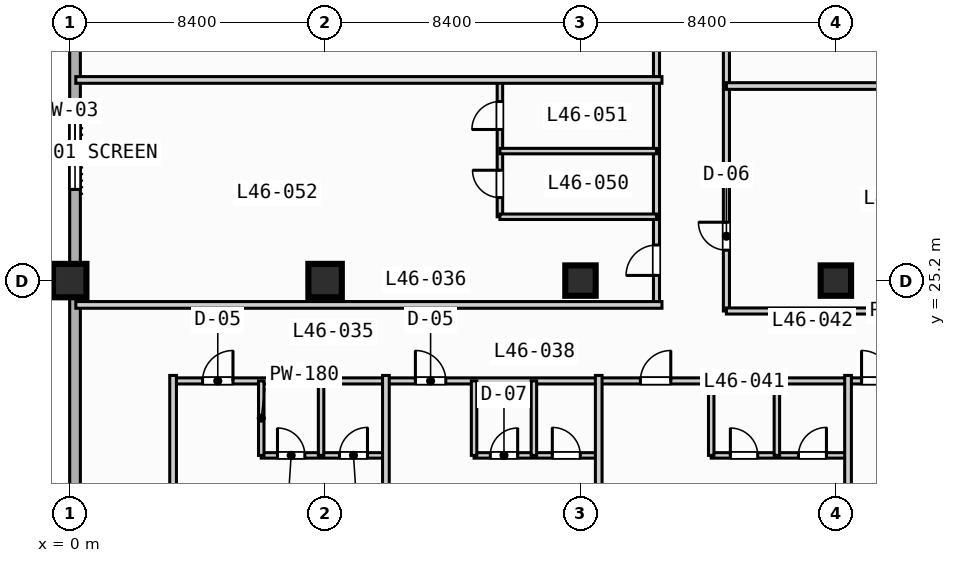
"""IFC4 building model, lengths in metres.
Left out: names, types, materials, properties, quantities, classifications, styles, units other than length and angle.
Written with IfcOpenShell. Run it as: python <this file> out.ifc"""

import sys

from ifc_helpers import new_model, si_unit, direction, frame, frame_2d, origin, origin_2d, place, context, subcontext, project, spatial, rectangle, extrude, element, fill, save


model = new_model("IFC4")
c1 = context("Model", 3, precision=1e-05, world=origin(), true_north=direction((0.0, 1.0)))
c2 = subcontext(c1, "Body", "Model", "MODEL_VIEW")
j1 = project(units=[si_unit("LENGTHUNIT", "METRE"), si_unit("PLANEANGLEUNIT", "RADIAN")], contexts=[c1])
p1 = place(None, origin())
s1 = spatial("IfcSite", under=j1, at=p1, CompositionType="ELEMENT")
p2 = place(p1, origin())
s2 = spatial("IfcBuilding", under=s1, at=p2, CompositionType="ELEMENT")
p3 = place(p2, frame((0.0, 0.0, 190.2)))
s3 = spatial("IfcBuildingStorey", under=s2, at=p3, CompositionType="ELEMENT", Elevation=190.2)
for number, where, z_axis, x_axis in (
    (1, (0.0, 25.2, 0.0), (0.0, 0.0, 1.0), (1.0, 0.0, 0.0)),
    (2, (8.4, 25.2, 0.0), (0.0, 0.0, 1.0), (1.0, 0.0, 0.0)),
):
    element("IfcColumn", number, at=place(p3, frame(where, z_axis=z_axis, x_axis=x_axis)), inside=s3, PredefinedType="COLUMN", context=c2, shape_type="SweptSolid", body=[
        extrude(rectangle(XDim=1.1, YDim=1.1, at=origin_2d()), origin(), (0.0, 0.0, 1.0), 3.7),
    ])
for number, where, z_axis, x_axis in (
    (3, (16.8, 25.2, 0.0), (0.0, 0.0, 1.0), (1.0, 0.0, 0.0)),
    (4, (25.2, 25.2, 0.0), (0.0, 0.0, 1.0), (1.0, 0.0, 0.0)),
):
    element("IfcColumn", number, at=place(p3, frame(where, z_axis=z_axis, x_axis=x_axis)), inside=s3, PredefinedType="COLUMN", context=c2, shape_type="SweptSolid", body=[
        extrude(rectangle(XDim=1.0, YDim=1.0, at=origin_2d()), origin(), (0.0, 0.0, 1.0), 3.7),
    ])
p4 = place(p3, frame((0.175, 3.175, 0.0), z_axis=(0.0, 0.0, 1.0), x_axis=(0.0, 1.0, 0.0)))
e5 = element("IfcWall", 5, at=p4, inside=s3, PredefinedType="STANDARD", context=c2, shape_type="SweptSolid", body=[
    extrude(rectangle(XDim=69.25, YDim=0.35, at=frame_2d((34.625, 0.0))), origin(), (0.0, 0.0, 1.0), 3.47),
])
p5 = place(p4, frame((42.325, 0.0, 0.0)))
e6 = element("IfcOpeningElement", 6, at=p5, cuts=e5, PredefinedType="OPENING", context=c2, shape_type="SweptSolid", body=[
    extrude(rectangle(XDim=1.4, YDim=2.2, at=frame_2d((0.7, 1.1))), frame((0.0, 0.185, 0.0), z_axis=(0.0, -1.0, 0.0), x_axis=(1.0, 0.0, 0.0)), (0.0, 0.0, 1.0), 0.37),
])
p6 = place(p4, frame((25.025, 0.0, 0.85)))
e7 = element("IfcOpeningElement", 7, at=p6, cuts=e5, PredefinedType="OPENING", context=c2, shape_type="SweptSolid", body=[
    extrude(rectangle(XDim=2.4, YDim=1.95, at=frame_2d((1.2, 0.975))), frame((0.0, 0.185, 0.0), z_axis=(0.0, -1.0, 0.0), x_axis=(1.0, 0.0, 0.0)), (0.0, 0.0, 1.0), 0.37),
])
p7 = place(p4, frame((33.725, 0.0, 0.85)))
e8 = element("IfcOpeningElement", 8, at=p7, cuts=e5, PredefinedType="OPENING", context=c2, shape_type="SweptSolid", body=[
    extrude(rectangle(XDim=1.8, YDim=1.8, at=frame_2d((0.9, 0.9))), frame((0.0, 0.185, 0.0), z_axis=(0.0, -1.0, 0.0), x_axis=(1.0, 0.0, 0.0)), (0.0, 0.0, 1.0), 0.37),
])
p8 = place(p4, frame((58.375, 0.0, 0.85)))
e9 = element("IfcOpeningElement", 9, at=p8, cuts=e5, PredefinedType="OPENING", context=c2, shape_type="SweptSolid", body=[
    extrude(rectangle(XDim=1.8, YDim=1.8, at=frame_2d((0.9, 0.9))), frame((0.0, 0.185, 0.0), z_axis=(0.0, -1.0, 0.0), x_axis=(1.0, 0.0, 0.0)), (0.0, 0.0, 1.0), 0.37),
])
p9 = place(p4, frame((64.775, 0.0, 0.85)))
e10 = element("IfcOpeningElement", 10, at=p9, cuts=e5, PredefinedType="OPENING", context=c2, shape_type="SweptSolid", body=[
    extrude(rectangle(XDim=1.8, YDim=1.8, at=frame_2d((0.9, 0.9))), frame((0.0, 0.185, 0.0), z_axis=(0.0, -1.0, 0.0), x_axis=(1.0, 0.0, 0.0)), (0.0, 0.0, 1.0), 0.37),
])
p10 = place(p3, frame((21.6, 24.2, 0.0), z_axis=(0.0, 0.0, 1.0), x_axis=(0.0, 1.0, 0.0)))
e11 = element("IfcWall", 11, at=p10, inside=s3, PredefinedType="PARTITIONING", context=c2, shape_type="SweptSolid", body=[
    extrude(rectangle(XDim=15.0, YDim=0.2, at=frame_2d((7.5, 0.0))), origin(), (0.0, 0.0, 1.0), 3.47),
])
p11 = place(p10, frame((2.0, 0.0, 0.0)))
e12 = element("IfcOpeningElement", 12, at=p11, cuts=e11, PredefinedType="OPENING", context=c2, shape_type="SweptSolid", body=[
    extrude(rectangle(XDim=0.92, YDim=2.1, at=frame_2d((0.46, 1.05))), frame((0.0, 0.11, 0.0), z_axis=(0.0, -1.0, 0.0), x_axis=(1.0, 0.0, 0.0)), (0.0, 0.0, 1.0), 0.22),
])
p12 = place(p10, frame((9.4, 0.0, 0.0)))
e13 = element("IfcOpeningElement", 13, at=p12, cuts=e11, PredefinedType="OPENING", context=c2, shape_type="SweptSolid", body=[
    extrude(rectangle(XDim=0.92, YDim=2.1, at=frame_2d((0.46, 1.05))), frame((0.0, 0.11, 0.0), z_axis=(0.0, -1.0, 0.0), x_axis=(1.0, 0.0, 0.0)), (0.0, 0.0, 1.0), 0.22),
])
p13 = place(p3, frame((21.6, 24.2, 0.0), z_axis=(0.0, 0.0, 1.0), x_axis=(1.0, 0.0, 0.0)))
e14 = element("IfcWall", 14, at=p13, inside=s3, PredefinedType="PARTITIONING", context=c2, shape_type="SweptSolid", body=[
    extrude(rectangle(XDim=11.7, YDim=0.2, at=frame_2d((5.85, 0.0))), origin(), (0.0, 0.0, 1.0), 3.47),
])
p14 = place(p3, frame((21.6, 31.6, 0.0), z_axis=(0.0, 0.0, 1.0), x_axis=(1.0, 0.0, 0.0)))
e15 = element("IfcWall", 15, at=p14, inside=s3, PredefinedType="PARTITIONING", context=c2, shape_type="SweptSolid", body=[
    extrude(rectangle(XDim=11.7, YDim=0.22, at=frame_2d((5.85, 0.0))), origin(), (0.0, 0.0, 1.0), 3.47),
])
p15 = place(p3, frame((3.4, 21.9, 0.0), z_axis=(0.0, 0.0, 1.0), x_axis=(1.0, 0.0, 0.0)))
e16 = element("IfcWall", 16, at=p15, inside=s3, PredefinedType="PARTITIONING", context=c2, shape_type="SweptSolid", body=[
    extrude(rectangle(XDim=35.8, YDim=0.2, at=frame_2d((17.9, 0.0))), origin(), (0.0, 0.0, 1.0), 3.47),
])
p16 = place(p15, frame((0.97, 0.0, 0.0)))
e17 = element("IfcOpeningElement", 17, at=p16, cuts=e16, PredefinedType="OPENING", context=c2, shape_type="SweptSolid", body=[
    extrude(rectangle(XDim=1.0, YDim=2.15, at=frame_2d((0.5, 1.075))), frame((0.0, 0.11, 0.0), z_axis=(0.0, -1.0, 0.0), x_axis=(1.0, 0.0, 0.0)), (0.0, 0.0, 1.0), 0.22),
])
p17 = place(p15, frame((7.97, 0.0, 0.0)))
e18 = element("IfcOpeningElement", 18, at=p17, cuts=e16, PredefinedType="OPENING", context=c2, shape_type="SweptSolid", body=[
    extrude(rectangle(XDim=1.0, YDim=2.15, at=frame_2d((0.5, 1.075))), frame((0.0, 0.11, 0.0), z_axis=(0.0, -1.0, 0.0), x_axis=(1.0, 0.0, 0.0)), (0.0, 0.0, 1.0), 0.22),
])
p18 = place(p15, frame((15.37, 0.0, 0.0)))
e19 = element("IfcOpeningElement", 19, at=p18, cuts=e16, PredefinedType="OPENING", context=c2, shape_type="SweptSolid", body=[
    extrude(rectangle(XDim=1.0, YDim=2.15, at=frame_2d((0.5, 1.075))), frame((0.0, 0.11, 0.0), z_axis=(0.0, -1.0, 0.0), x_axis=(1.0, 0.0, 0.0)), (0.0, 0.0, 1.0), 0.22),
])
p19 = place(p15, frame((22.645, 0.0, 0.0)))
e20 = element("IfcOpeningElement", 20, at=p19, cuts=e16, PredefinedType="OPENING", context=c2, shape_type="SweptSolid", body=[
    extrude(rectangle(XDim=1.0, YDim=2.15, at=frame_2d((0.5, 1.075))), frame((0.0, 0.11, 0.0), z_axis=(0.0, -1.0, 0.0), x_axis=(1.0, 0.0, 0.0)), (0.0, 0.0, 1.0), 0.22),
])
p20 = place(p15, frame((28.97, 0.0, 0.0)))
e21 = element("IfcOpeningElement", 21, at=p20, cuts=e16, PredefinedType="OPENING", context=c2, shape_type="SweptSolid", body=[
    extrude(rectangle(XDim=1.0, YDim=2.15, at=frame_2d((0.5, 1.075))), frame((0.0, 0.11, 0.0), z_axis=(0.0, -1.0, 0.0), x_axis=(1.0, 0.0, 0.0)), (0.0, 0.0, 1.0), 0.22),
])
p21 = place(p3, frame((3.4, 0.2, 0.0), z_axis=(0.0, 0.0, 1.0), x_axis=(0.0, 1.0, 0.0)))
e22 = element("IfcWall", 22, at=p21, inside=s3, PredefinedType="PARTITIONING", context=c2, shape_type="SweptSolid", body=[
    extrude(rectangle(XDim=21.88, YDim=0.22, at=frame_2d((10.94, 0.0))), origin(), (0.0, 0.0, 1.0), 3.47),
])
p22 = place(p3, frame((6.3, 19.45, 0.0), z_axis=(0.0, 0.0, 1.0), x_axis=(1.0, 0.0, 0.0)))
e23 = element("IfcWall", 23, at=p22, inside=s3, PredefinedType="PLUMBINGWALL", context=c2, shape_type="SweptSolid", body=[
    extrude(rectangle(XDim=4.1, YDim=0.18, at=frame_2d((2.05, 0.0))), origin(), (0.0, 0.0, 1.0), 3.47),
])
p23 = place(p22, frame((0.534, 0.0, 0.0)))
e24 = element("IfcOpeningElement", 24, at=p23, cuts=e23, PredefinedType="OPENING", context=c2, shape_type="SweptSolid", body=[
    extrude(rectangle(XDim=0.9, YDim=2.1, at=frame_2d((0.45, 1.05))), frame((0.0, 0.1, 0.0), z_axis=(0.0, -1.0, 0.0), x_axis=(1.0, 0.0, 0.0)), (0.0, 0.0, 1.0), 0.2),
])
p24 = place(p22, frame((2.574, 0.0, 0.0)))
e25 = element("IfcOpeningElement", 25, at=p24, cuts=e23, PredefinedType="OPENING", context=c2, shape_type="SweptSolid", body=[
    extrude(rectangle(XDim=0.92, YDim=2.1, at=frame_2d((0.46, 1.05))), frame((0.0, 0.1, 0.0), z_axis=(0.0, -1.0, 0.0), x_axis=(1.0, 0.0, 0.0)), (0.0, 0.0, 1.0), 0.2),
])
p25 = place(p3, frame((6.3, 19.45, 0.0), z_axis=(0.0, 0.0, 1.0), x_axis=(0.0, 1.0, 0.0)))
e26 = element("IfcWall", 26, at=p25, inside=s3, PredefinedType="PLUMBINGWALL", context=c2, shape_type="SweptSolid", body=[
    extrude(rectangle(XDim=2.45, YDim=0.18, at=frame_2d((1.225, 0.0))), origin(), (0.0, 0.0, 1.0), 3.47),
])
p26 = place(p3, frame((8.268, 19.45, 0.0), z_axis=(0.0, 0.0, 1.0), x_axis=(0.0, 1.0, 0.0)))
e27 = element("IfcWall", 27, at=p26, inside=s3, PredefinedType="PLUMBINGWALL", context=c2, shape_type="SweptSolid", body=[
    extrude(rectangle(XDim=2.45, YDim=0.18, at=frame_2d((1.225, 0.0))), origin(), (0.0, 0.0, 1.0), 2.82),
])
p27 = place(p3, frame((10.4, 0.2, 0.0), z_axis=(0.0, 0.0, 1.0), x_axis=(0.0, 1.0, 0.0)))
e28 = element("IfcWall", 28, at=p27, inside=s3, PredefinedType="PARTITIONING", context=c2, shape_type="SweptSolid", body=[
    extrude(rectangle(XDim=21.88, YDim=0.22, at=frame_2d((10.94, 0.0))), origin(), (0.0, 0.0, 1.0), 3.47),
])
p28 = place(p3, frame((13.3, 19.45, 0.0), z_axis=(0.0, 0.0, 1.0), x_axis=(1.0, 0.0, 0.0)))
e29 = element("IfcWall", 29, at=p28, inside=s3, PredefinedType="PLUMBINGWALL", context=c2, shape_type="SweptSolid", body=[
    extrude(rectangle(XDim=4.1, YDim=0.18, at=frame_2d((2.05, 0.0))), origin(), (0.0, 0.0, 1.0), 3.47),
])
p29 = place(p28, frame((0.534, 0.0, 0.0)))
e30 = element("IfcOpeningElement", 30, at=p29, cuts=e29, PredefinedType="OPENING", context=c2, shape_type="SweptSolid", body=[
    extrude(rectangle(XDim=0.9, YDim=2.1, at=frame_2d((0.45, 1.05))), frame((0.0, 0.1, 0.0), z_axis=(0.0, -1.0, 0.0), x_axis=(1.0, 0.0, 0.0)), (0.0, 0.0, 1.0), 0.2),
])
p30 = place(p28, frame((2.574, 0.0, 0.0)))
e31 = element("IfcOpeningElement", 31, at=p30, cuts=e29, PredefinedType="OPENING", context=c2, shape_type="SweptSolid", body=[
    extrude(rectangle(XDim=0.92, YDim=2.1, at=frame_2d((0.46, 1.05))), frame((0.0, 0.1, 0.0), z_axis=(0.0, -1.0, 0.0), x_axis=(1.0, 0.0, 0.0)), (0.0, 0.0, 1.0), 0.2),
])
for number, where, z_axis, x_axis in (
    (32, (13.3, 19.45, 0.0), (0.0, 0.0, 1.0), (0.0, 1.0, 0.0)),
    (33, (15.268, 19.45, 0.0), (0.0, 0.0, 1.0), (0.0, 1.0, 0.0)),
):
    element("IfcWall", number, at=place(p3, frame(where, z_axis=z_axis, x_axis=x_axis)), inside=s3, PredefinedType="PLUMBINGWALL", context=c2, shape_type="SweptSolid", body=[
        extrude(rectangle(XDim=2.45, YDim=0.18, at=frame_2d((1.225, 0.0))), origin(), (0.0, 0.0, 1.0), 3.47),
    ])
p31 = place(p3, frame((17.4, 0.2, 0.0), z_axis=(0.0, 0.0, 1.0), x_axis=(0.0, 1.0, 0.0)))
e34 = element("IfcWall", 34, at=p31, inside=s3, PredefinedType="PARTITIONING", context=c2, shape_type="SweptSolid", body=[
    extrude(rectangle(XDim=21.88, YDim=0.22, at=frame_2d((10.94, 0.0))), origin(), (0.0, 0.0, 1.0), 3.47),
])
p32 = place(p3, frame((21.1, 19.45, 0.0), z_axis=(0.0, 0.0, 1.0), x_axis=(1.0, 0.0, 0.0)))
e35 = element("IfcWall", 35, at=p32, inside=s3, PredefinedType="PLUMBINGWALL", context=c2, shape_type="SweptSolid", body=[
    extrude(rectangle(XDim=4.5, YDim=0.18, at=frame_2d((2.25, 0.0))), origin(), (0.0, 0.0, 1.0), 3.47),
])
p33 = place(p32, frame((0.63, 0.0, 0.0)))
e36 = element("IfcOpeningElement", 36, at=p33, cuts=e35, PredefinedType="OPENING", context=c2, shape_type="SweptSolid", body=[
    extrude(rectangle(XDim=0.9, YDim=2.1, at=frame_2d((0.45, 1.05))), frame((0.0, 0.1, 0.0), z_axis=(0.0, -1.0, 0.0), x_axis=(1.0, 0.0, 0.0)), (0.0, 0.0, 1.0), 0.2),
])
p34 = place(p32, frame((2.87, 0.0, 0.0)))
e37 = element("IfcOpeningElement", 37, at=p34, cuts=e35, PredefinedType="OPENING", context=c2, shape_type="SweptSolid", body=[
    extrude(rectangle(XDim=0.92, YDim=2.1, at=frame_2d((0.46, 1.05))), frame((0.0, 0.1, 0.0), z_axis=(0.0, -1.0, 0.0), x_axis=(1.0, 0.0, 0.0)), (0.0, 0.0, 1.0), 0.2),
])
for number, where, z_axis, x_axis in (
    (38, (21.1, 19.45, 0.0), (0.0, 0.0, 1.0), (0.0, 1.0, 0.0)),
    (39, (23.26, 19.45, 0.0), (0.0, 0.0, 1.0), (0.0, 1.0, 0.0)),
):
    element("IfcWall", number, at=place(p3, frame(where, z_axis=z_axis, x_axis=x_axis)), inside=s3, PredefinedType="PLUMBINGWALL", context=c2, shape_type="SweptSolid", body=[
        extrude(rectangle(XDim=2.45, YDim=0.18, at=frame_2d((1.225, 0.0))), origin(), (0.0, 0.0, 1.0), 3.47),
    ])
p35 = place(p3, frame((25.6, 0.2, 0.0), z_axis=(0.0, 0.0, 1.0), x_axis=(0.0, 1.0, 0.0)))
e40 = element("IfcWall", 40, at=p35, inside=s3, PredefinedType="PARTITIONING", context=c2, shape_type="SweptSolid", body=[
    extrude(rectangle(XDim=21.88, YDim=0.22, at=frame_2d((10.94, 0.0))), origin(), (0.0, 0.0, 1.0), 3.47),
])
p36 = place(p3, frame((19.3, 24.4, 0.0), z_axis=(0.0, 0.0, 1.0), x_axis=(0.0, 1.0, 0.0)))
e41 = element("IfcWall", 41, at=p36, inside=s3, PredefinedType="PARTITIONING", context=c2, shape_type="SweptSolid", body=[
    extrude(rectangle(XDim=14.8, YDim=0.2, at=frame_2d((7.4, 0.0))), origin(), (0.0, 0.0, 1.0), 3.47),
])
p37 = place(p36, frame((0.97, 0.0, 0.0)))
e42 = element("IfcOpeningElement", 42, at=p37, cuts=e41, PredefinedType="OPENING", context=c2, shape_type="SweptSolid", body=[
    extrude(rectangle(XDim=1.0, YDim=2.15, at=frame_2d((0.5, 1.075))), frame((0.0, 0.11, 0.0), z_axis=(0.0, -1.0, 0.0), x_axis=(1.0, 0.0, 0.0)), (0.0, 0.0, 1.0), 0.22),
])
p38 = place(p36, frame((8.37, 0.0, 0.0)))
e43 = element("IfcOpeningElement", 43, at=p38, cuts=e41, PredefinedType="OPENING", context=c2, shape_type="SweptSolid", body=[
    extrude(rectangle(XDim=1.0, YDim=2.15, at=frame_2d((0.5, 1.075))), frame((0.0, 0.11, 0.0), z_axis=(0.0, -1.0, 0.0), x_axis=(1.0, 0.0, 0.0)), (0.0, 0.0, 1.0), 0.22),
])
p39 = place(p3, frame((0.2, 24.4, 0.0), z_axis=(0.0, 0.0, 1.0), x_axis=(1.0, 0.0, 0.0)))
e44 = element("IfcWall", 44, at=p39, inside=s3, PredefinedType="PARTITIONING", context=c2, shape_type="SweptSolid", body=[
    extrude(rectangle(XDim=19.28, YDim=0.22, at=frame_2d((9.64, 0.0))), origin(), (0.0, 0.0, 1.0), 3.47),
])
p40 = place(p3, frame((14.15, 27.3, 0.0), z_axis=(0.0, 0.0, 1.0), x_axis=(0.0, 1.0, 0.0)))
e45 = element("IfcWall", 45, at=p40, inside=s3, PredefinedType="PLUMBINGWALL", context=c2, shape_type="SweptSolid", body=[
    extrude(rectangle(XDim=4.5, YDim=0.18, at=frame_2d((2.25, 0.0))), origin(), (0.0, 0.0, 1.0), 3.47),
])
p41 = place(p40, frame((0.63, 0.0, 0.0)))
e46 = element("IfcOpeningElement", 46, at=p41, cuts=e45, PredefinedType="OPENING", context=c2, shape_type="SweptSolid", body=[
    extrude(rectangle(XDim=0.9, YDim=2.1, at=frame_2d((0.45, 1.05))), frame((0.0, 0.1, 0.0), z_axis=(0.0, -1.0, 0.0), x_axis=(1.0, 0.0, 0.0)), (0.0, 0.0, 1.0), 0.2),
])
p42 = place(p40, frame((2.87, 0.0, 0.0)))
e47 = element("IfcOpeningElement", 47, at=p42, cuts=e45, PredefinedType="OPENING", context=c2, shape_type="SweptSolid", body=[
    extrude(rectangle(XDim=0.92, YDim=2.1, at=frame_2d((0.46, 1.05))), frame((0.0, 0.1, 0.0), z_axis=(0.0, -1.0, 0.0), x_axis=(1.0, 0.0, 0.0)), (0.0, 0.0, 1.0), 0.2),
])
for number, where, z_axis, x_axis in (
    (48, (14.15, 27.3, 0.0), (0.0, 0.0, 1.0), (1.0, 0.0, 0.0)),
    (49, (14.15, 29.46, 0.0), (0.0, 0.0, 1.0), (1.0, 0.0, 0.0)),
):
    element("IfcWall", number, at=place(p3, frame(where, z_axis=z_axis, x_axis=x_axis)), inside=s3, PredefinedType="PLUMBINGWALL", context=c2, shape_type="SweptSolid", body=[
        extrude(rectangle(XDim=5.15, YDim=0.18, at=frame_2d((2.575, 0.0))), origin(), (0.0, 0.0, 1.0), 3.47),
    ])
p43 = place(p3, frame((0.2, 31.8, 0.0), z_axis=(0.0, 0.0, 1.0), x_axis=(1.0, 0.0, 0.0)))
e50 = element("IfcWall", 50, at=p43, inside=s3, PredefinedType="PARTITIONING", context=c2, shape_type="SweptSolid", body=[
    extrude(rectangle(XDim=19.28, YDim=0.22, at=frame_2d((9.64, 0.0))), origin(), (0.0, 0.0, 1.0), 3.47),
])
p44 = place(p6, origin())
e51 = element("IfcWindow", 51, at=p44, inside=s3, PartitioningType="SINGLE_PANEL", PredefinedType="WINDOW", context=c2, shape_type="SweptSolid", body=[
    extrude(rectangle(XDim=2.4, YDim=1.95, at=frame_2d((1.2, 0.975))), frame((0.0, 0.03, 0.0), z_axis=(0.0, -1.0, 0.0), x_axis=(1.0, 0.0, 0.0)), (0.0, 0.0, 1.0), 0.06),
])
fill(e7, e51)
p45 = place(p11, origin())
e52 = element("IfcDoor", 52, at=p45, inside=s3, OperationType="SINGLE_SWING_RIGHT", PredefinedType="DOOR", context=c2, shape_type="SweptSolid", body=[
    extrude(rectangle(XDim=0.92, YDim=2.1, at=frame_2d((0.46, 1.05))), frame((0.0, 0.025, 0.0), z_axis=(0.0, -1.0, 0.0), x_axis=(1.0, 0.0, 0.0)), (0.0, 0.0, 1.0), 0.05),
])
fill(e12, e52)
p46 = place(p16, origin())
e53 = element("IfcDoor", 53, at=p46, inside=s3, OperationType="SINGLE_SWING_RIGHT", PredefinedType="DOOR", context=c2, shape_type="SweptSolid", body=[
    extrude(rectangle(XDim=1.0, YDim=2.15, at=frame_2d((0.5, 1.075))), frame((0.0, 0.025, 0.0), z_axis=(0.0, -1.0, 0.0), x_axis=(1.0, 0.0, 0.0)), (0.0, 0.0, 1.0), 0.05),
])
fill(e17, e53)
p47 = place(p17, origin())
e54 = element("IfcDoor", 54, at=p47, inside=s3, OperationType="SINGLE_SWING_LEFT", PredefinedType="DOOR", context=c2, shape_type="SweptSolid", body=[
    extrude(rectangle(XDim=1.0, YDim=2.15, at=frame_2d((0.5, 1.075))), frame((0.0, 0.025, 0.0), z_axis=(0.0, -1.0, 0.0), x_axis=(1.0, 0.0, 0.0)), (0.0, 0.0, 1.0), 0.05),
])
fill(e18, e54)
p48 = place(p18, origin())
e55 = element("IfcDoor", 55, at=p48, inside=s3, OperationType="SINGLE_SWING_RIGHT", PredefinedType="DOOR", context=c2, shape_type="SweptSolid", body=[
    extrude(rectangle(XDim=1.0, YDim=2.15, at=frame_2d((0.5, 1.075))), frame((0.0, 0.025, 0.0), z_axis=(0.0, -1.0, 0.0), x_axis=(1.0, 0.0, 0.0)), (0.0, 0.0, 1.0), 0.05),
])
fill(e19, e55)
p49 = place(p19, origin())
e56 = element("IfcDoor", 56, at=p49, inside=s3, OperationType="SINGLE_SWING_LEFT", PredefinedType="DOOR", context=c2, shape_type="SweptSolid", body=[
    extrude(rectangle(XDim=1.0, YDim=2.15, at=frame_2d((0.5, 1.075))), frame((0.0, 0.025, 0.0), z_axis=(0.0, -1.0, 0.0), x_axis=(1.0, 0.0, 0.0)), (0.0, 0.0, 1.0), 0.05),
])
fill(e20, e56)
p50 = place(p23, origin())
e57 = element("IfcDoor", 57, at=p50, inside=s3, OperationType="SINGLE_SWING_LEFT", PredefinedType="DOOR", context=c2, shape_type="SweptSolid", body=[
    extrude(rectangle(XDim=0.9, YDim=2.1, at=frame_2d((0.45, 1.05))), frame((0.0, 0.025, 0.0), z_axis=(0.0, -1.0, 0.0), x_axis=(1.0, 0.0, 0.0)), (0.0, 0.0, 1.0), 0.05),
])
fill(e24, e57)
p51 = place(p24, origin())
e58 = element("IfcDoor", 58, at=p51, inside=s3, OperationType="SINGLE_SWING_RIGHT", PredefinedType="DOOR", context=c2, shape_type="SweptSolid", body=[
    extrude(rectangle(XDim=0.92, YDim=2.1, at=frame_2d((0.46, 1.05))), frame((0.0, 0.025, 0.0), z_axis=(0.0, -1.0, 0.0), x_axis=(1.0, 0.0, 0.0)), (0.0, 0.0, 1.0), 0.05),
])
fill(e25, e58)
p52 = place(p29, origin())
e59 = element("IfcDoor", 59, at=p52, inside=s3, OperationType="SINGLE_SWING_RIGHT", PredefinedType="DOOR", context=c2, shape_type="SweptSolid", body=[
    extrude(rectangle(XDim=0.9, YDim=2.1, at=frame_2d((0.45, 1.05))), frame((0.0, 0.025, 0.0), z_axis=(0.0, -1.0, 0.0), x_axis=(1.0, 0.0, 0.0)), (0.0, 0.0, 1.0), 0.05),
])
fill(e30, e59)
p53 = place(p30, origin())
e60 = element("IfcDoor", 60, at=p53, inside=s3, OperationType="SINGLE_SWING_LEFT", PredefinedType="DOOR", context=c2, shape_type="SweptSolid", body=[
    extrude(rectangle(XDim=0.92, YDim=2.1, at=frame_2d((0.46, 1.05))), frame((0.0, 0.025, 0.0), z_axis=(0.0, -1.0, 0.0), x_axis=(1.0, 0.0, 0.0)), (0.0, 0.0, 1.0), 0.05),
])
fill(e31, e60)
p54 = place(p33, origin())
e61 = element("IfcDoor", 61, at=p54, inside=s3, OperationType="SINGLE_SWING_LEFT", PredefinedType="DOOR", context=c2, shape_type="SweptSolid", body=[
    extrude(rectangle(XDim=0.9, YDim=2.1, at=frame_2d((0.45, 1.05))), frame((0.0, 0.025, 0.0), z_axis=(0.0, -1.0, 0.0), x_axis=(1.0, 0.0, 0.0)), (0.0, 0.0, 1.0), 0.05),
])
fill(e36, e61)
p55 = place(p34, origin())
e62 = element("IfcDoor", 62, at=p55, inside=s3, OperationType="SINGLE_SWING_RIGHT", PredefinedType="DOOR", context=c2, shape_type="SweptSolid", body=[
    extrude(rectangle(XDim=0.92, YDim=2.1, at=frame_2d((0.46, 1.05))), frame((0.0, 0.025, 0.0), z_axis=(0.0, -1.0, 0.0), x_axis=(1.0, 0.0, 0.0)), (0.0, 0.0, 1.0), 0.05),
])
fill(e37, e62)
p56 = place(p37, origin())
e63 = element("IfcDoor", 63, at=p56, inside=s3, OperationType="SINGLE_SWING_LEFT", PredefinedType="DOOR", context=c2, shape_type="SweptSolid", body=[
    extrude(rectangle(XDim=1.0, YDim=2.15, at=frame_2d((0.5, 1.075))), frame((0.0, 0.025, 0.0), z_axis=(0.0, -1.0, 0.0), x_axis=(1.0, 0.0, 0.0)), (0.0, 0.0, 1.0), 0.05),
])
fill(e42, e63)
p57 = place(p41, origin())
e64 = element("IfcDoor", 64, at=p57, inside=s3, OperationType="SINGLE_SWING_RIGHT", PredefinedType="DOOR", context=c2, shape_type="SweptSolid", body=[
    extrude(rectangle(XDim=0.9, YDim=2.1, at=frame_2d((0.45, 1.05))), frame((0.0, 0.025, 0.0), z_axis=(0.0, -1.0, 0.0), x_axis=(1.0, 0.0, 0.0)), (0.0, 0.0, 1.0), 0.05),
])
fill(e46, e64)
p58 = place(p42, origin())
e65 = element("IfcDoor", 65, at=p58, inside=s3, OperationType="SINGLE_SWING_LEFT", PredefinedType="DOOR", context=c2, shape_type="SweptSolid", body=[
    extrude(rectangle(XDim=0.92, YDim=2.1, at=frame_2d((0.46, 1.05))), frame((0.0, 0.025, 0.0), z_axis=(0.0, -1.0, 0.0), x_axis=(1.0, 0.0, 0.0)), (0.0, 0.0, 1.0), 0.05),
])
fill(e47, e65)
save(model, sys.argv[1])
